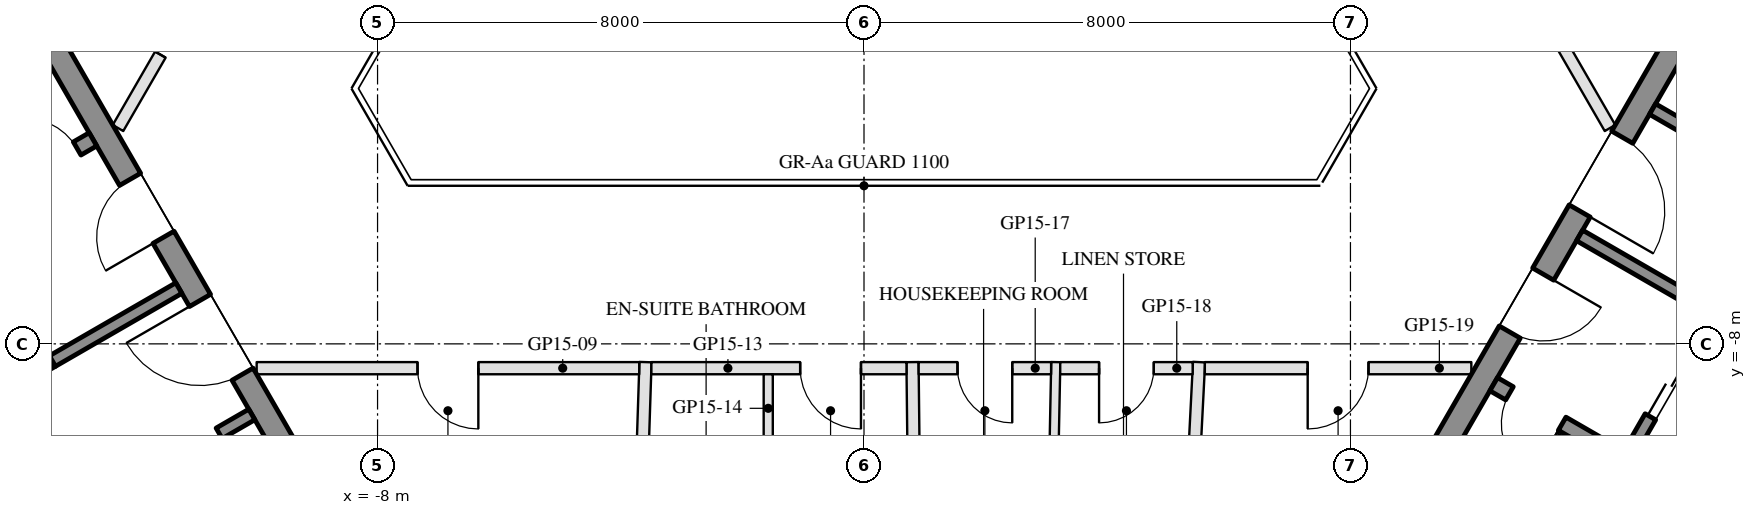
"""IFC4 building model, lengths in metres.
Left out: names, types, materials, properties, quantities, classifications, styles, units other than length and angle.
Written with IfcOpenShell. Run it as: python <this file> out.ifc"""

import sys

from ifc_helpers import new_model, si_unit, direction, frame, frame_2d, origin, place, context, subcontext, project, spatial, rectangle, extrude, element, fill, save


model = new_model("IFC4")
c1 = context("Model", 3, precision=1e-05, world=origin(), true_north=direction((0.0, 1.0)))
c2 = subcontext(c1, "Body", "Model", "MODEL_VIEW")
j1 = project(units=[si_unit("LENGTHUNIT", "METRE"), si_unit("PLANEANGLEUNIT", "RADIAN")], contexts=[c1])
p1 = place(None, origin())
s1 = spatial("IfcSite", under=j1, at=p1, CompositionType="ELEMENT")
p2 = place(p1, origin())
s2 = spatial("IfcBuilding", under=s1, at=p2, CompositionType="ELEMENT")
p3 = place(p2, frame((0.0, 0.0, 172.5)))
s3 = spatial("IfcBuildingStorey", under=s2, at=p3, CompositionType="ELEMENT", Elevation=172.5)
p4 = place(p3, frame((-13.845, -2.22, 0.0), z_axis=(0.0, 0.0, 1.0), x_axis=(0.500004234368, -0.866022959057, 0.0)))
e1 = element("IfcWall", 1, at=p4, inside=s3, PredefinedType="SHEAR", context=c2, shape_type="SweptSolid", body=[
    extrude(rectangle(XDim=10.0, YDim=0.4, at=frame_2d((5.0, 0.0))), origin(), (0.0, 0.0, 1.0), 3.5),
])
p5 = place(p4, frame((3.55, 0.0, 0.0)))
e2 = element("IfcOpeningElement", 2, at=p5, cuts=e1, PredefinedType="OPENING", context=c2, shape_type="SweptSolid", body=[
    extrude(rectangle(XDim=1.1, YDim=2.1, at=frame_2d((0.55, 1.05))), frame((0.0, 0.21, 0.0), z_axis=(0.0, -1.0, 0.0), x_axis=(1.0, 0.0, 0.0)), (0.0, 0.0, 1.0), 0.42),
])
p6 = place(p4, frame((5.85, 0.0, 0.0)))
e3 = element("IfcOpeningElement", 3, at=p6, cuts=e1, PredefinedType="OPENING", context=c2, shape_type="SweptSolid", body=[
    extrude(rectangle(XDim=1.4, YDim=2.1, at=frame_2d((0.7, 1.05))), frame((0.0, 0.21, 0.0), z_axis=(0.0, -1.0, 0.0), x_axis=(1.0, 0.0, 0.0)), (0.0, 0.0, 1.0), 0.42),
])
p7 = place(p3, frame((-12.681, -4.636, 0.0), z_axis=(0.0, 0.0, 1.0), x_axis=(-0.866021702275, -0.500006411147, 0.0)))
e4 = element("IfcWall", 4, at=p7, inside=s3, PredefinedType="SHEAR", context=c2, shape_type="SweptSolid", body=[
    extrude(rectangle(XDim=6.45, YDim=0.25, at=frame_2d((3.225, 0.0))), origin(), (0.0, 0.0, 1.0), 3.5),
])
p8 = place(p7, frame((0.3, 0.0, 0.0)))
e5 = element("IfcOpeningElement", 5, at=p8, cuts=e4, PredefinedType="OPENING", context=c2, shape_type="SweptSolid", body=[
    extrude(rectangle(XDim=1.0, YDim=2.1, at=frame_2d((0.5, 1.05))), frame((0.0, 0.135, 0.0), z_axis=(0.0, -1.0, 0.0), x_axis=(1.0, 0.0, 0.0)), (0.0, 0.0, 1.0), 0.27),
])
p9 = place(p3, frame((-14.783, -5.995, 0.0), z_axis=(0.0, 0.0, 1.0), x_axis=(0.49994636267, -0.866056369097, 0.0)))
e6 = element("IfcWall", 6, at=p9, inside=s3, PredefinedType="SHEAR", context=c2, shape_type="SweptSolid", body=[
    extrude(rectangle(XDim=2.8, YDim=0.2, at=frame_2d((1.4, 0.0))), origin(), (0.0, 0.0, 1.0), 3.5),
])
p10 = place(p9, frame((0.7, 0.0, 0.0)))
e7 = element("IfcOpeningElement", 7, at=p10, cuts=e6, PredefinedType="OPENING", context=c2, shape_type="SweptSolid", body=[
    extrude(rectangle(XDim=1.2, YDim=2.1, at=frame_2d((0.6, 1.05))), frame((0.0, 0.11, 0.0), z_axis=(0.0, -1.0, 0.0), x_axis=(1.0, 0.0, 0.0)), (0.0, 0.0, 1.0), 0.22),
])
p11 = place(p3, frame((-11.268, -7.083, 0.0), z_axis=(0.0, 0.0, 1.0), x_axis=(-0.866050077142, -0.499957262057, 0.0)))
e8 = element("IfcWall", 8, at=p11, inside=s3, PredefinedType="SHEAR", context=c2, shape_type="SweptSolid", body=[
    extrude(rectangle(XDim=2.4, YDim=0.2, at=frame_2d((1.2, 0.0))), origin(), (0.0, 0.0, 1.0), 3.5),
])
p12 = place(p3, frame((-10.068, -9.162, 0.0), z_axis=(0.0, 0.0, 1.0), x_axis=(-0.866032725843, -0.499987317609, 0.0)))
e9 = element("IfcWall", 9, at=p12, inside=s3, PredefinedType="SHEAR", context=c2, shape_type="SweptSolid", body=[
    extrude(rectangle(XDim=10.16, YDim=0.2, at=frame_2d((5.08, 0.0))), origin(), (0.0, 0.0, 1.0), 3.5),
])
p13 = place(p12, frame((0.62, 0.0, 0.0)))
e10 = element("IfcOpeningElement", 10, at=p13, cuts=e9, PredefinedType="OPENING", context=c2, shape_type="SweptSolid", body=[
    extrude(rectangle(XDim=1.1, YDim=2.1, at=frame_2d((0.55, 1.05))), frame((0.0, 0.11, 0.0), z_axis=(0.0, -1.0, 0.0), x_axis=(1.0, 0.0, 0.0)), (0.0, 0.0, 1.0), 0.22),
])
p14 = place(p12, frame((3.16, 0.0, 0.0)))
e11 = element("IfcOpeningElement", 11, at=p14, cuts=e9, PredefinedType="OPENING", context=c2, shape_type="SweptSolid", body=[
    extrude(rectangle(XDim=1.1, YDim=2.1, at=frame_2d((0.55, 1.05))), frame((0.0, 0.11, 0.0), z_axis=(0.0, -1.0, 0.0), x_axis=(1.0, 0.0, 0.0)), (0.0, 0.0, 1.0), 0.22),
])
p15 = place(p12, frame((5.7, 0.0, 0.0)))
e12 = element("IfcOpeningElement", 12, at=p15, cuts=e9, PredefinedType="OPENING", context=c2, shape_type="SweptSolid", body=[
    extrude(rectangle(XDim=1.1, YDim=2.1, at=frame_2d((0.55, 1.05))), frame((0.0, 0.11, 0.0), z_axis=(0.0, -1.0, 0.0), x_axis=(1.0, 0.0, 0.0)), (0.0, 0.0, 1.0), 0.22),
])
p16 = place(p12, frame((8.24, 0.0, 0.0)))
e13 = element("IfcOpeningElement", 13, at=p16, cuts=e9, PredefinedType="OPENING", context=c2, shape_type="SweptSolid", body=[
    extrude(rectangle(XDim=1.1, YDim=2.1, at=frame_2d((0.55, 1.05))), frame((0.0, 0.11, 0.0), z_axis=(0.0, -1.0, 0.0), x_axis=(1.0, 0.0, 0.0)), (0.0, 0.0, 1.0), 0.22),
])
p17 = place(p3, frame((8.845, -10.88, 0.0), z_axis=(0.0, 0.0, 1.0), x_axis=(0.500004234368, 0.866022959057, 0.0)))
e14 = element("IfcWall", 14, at=p17, inside=s3, PredefinedType="SHEAR", context=c2, shape_type="SweptSolid", body=[
    extrude(rectangle(XDim=10.0, YDim=0.4, at=frame_2d((5.0, 0.0))), origin(), (0.0, 0.0, 1.0), 3.5),
])
p18 = place(p17, frame((3.55, 0.0, 0.0)))
e15 = element("IfcOpeningElement", 15, at=p18, cuts=e14, PredefinedType="OPENING", context=c2, shape_type="SweptSolid", body=[
    extrude(rectangle(XDim=1.1, YDim=2.1, at=frame_2d((0.55, 1.05))), frame((0.0, 0.21, 0.0), z_axis=(0.0, -1.0, 0.0), x_axis=(1.0, 0.0, 0.0)), (0.0, 0.0, 1.0), 0.42),
])
p19 = place(p17, frame((5.85, 0.0, 0.0)))
e16 = element("IfcOpeningElement", 16, at=p19, cuts=e14, PredefinedType="OPENING", context=c2, shape_type="SweptSolid", body=[
    extrude(rectangle(XDim=1.4, YDim=2.1, at=frame_2d((0.7, 1.05))), frame((0.0, 0.21, 0.0), z_axis=(0.0, -1.0, 0.0), x_axis=(1.0, 0.0, 0.0)), (0.0, 0.0, 1.0), 0.42),
])
p20 = place(p3, frame((10.356, -8.664, 0.0), z_axis=(0.0, 0.0, 1.0), x_axis=(0.866028629588, -0.499994412703, 0.0)))
e17 = element("IfcWall", 17, at=p20, inside=s3, PredefinedType="SHEAR", context=c2, shape_type="SweptSolid", body=[
    extrude(rectangle(XDim=6.45, YDim=0.25, at=frame_2d((3.225, 0.0))), origin(), (0.0, 0.0, 1.0), 3.5),
])
p21 = place(p20, frame((0.3, 0.0, 0.0)))
e18 = element("IfcOpeningElement", 18, at=p21, cuts=e17, PredefinedType="OPENING", context=c2, shape_type="SweptSolid", body=[
    extrude(rectangle(XDim=1.0, YDim=2.1, at=frame_2d((0.5, 1.05))), frame((0.0, 0.135, 0.0), z_axis=(0.0, -1.0, 0.0), x_axis=(1.0, 0.0, 0.0)), (0.0, 0.0, 1.0), 0.27),
])
p22 = place(p3, frame((12.583, -9.805, 0.0), z_axis=(0.0, 0.0, 1.0), x_axis=(0.49994636267, 0.866056369097, 0.0)))
e19 = element("IfcWall", 19, at=p22, inside=s3, PredefinedType="SHEAR", context=c2, shape_type="SweptSolid", body=[
    extrude(rectangle(XDim=2.8, YDim=0.2, at=frame_2d((1.4, 0.0))), origin(), (0.0, 0.0, 1.0), 3.5),
])
p23 = place(p22, frame((0.7, 0.0, 0.0)))
e20 = element("IfcOpeningElement", 20, at=p23, cuts=e19, PredefinedType="OPENING", context=c2, shape_type="SweptSolid", body=[
    extrude(rectangle(XDim=1.2, YDim=2.1, at=frame_2d((0.6, 1.05))), frame((0.0, 0.11, 0.0), z_axis=(0.0, -1.0, 0.0), x_axis=(1.0, 0.0, 0.0)), (0.0, 0.0, 1.0), 0.22),
])
p24 = place(p3, frame((11.768, -6.217, 0.0), z_axis=(0.0, 0.0, 1.0), x_axis=(0.866050077142, -0.499957262057, 0.0)))
e21 = element("IfcWall", 21, at=p24, inside=s3, PredefinedType="SHEAR", context=c2, shape_type="SweptSolid", body=[
    extrude(rectangle(XDim=2.4, YDim=0.2, at=frame_2d((1.2, 0.0))), origin(), (0.0, 0.0, 1.0), 3.5),
])
p25 = place(p3, frame((12.968, -4.138, 0.0), z_axis=(0.0, 0.0, 1.0), x_axis=(0.866028328073, -0.49999493495, 0.0)))
e22 = element("IfcWall", 22, at=p25, inside=s3, PredefinedType="SHEAR", context=c2, shape_type="SweptSolid", body=[
    extrude(rectangle(XDim=10.16, YDim=0.2, at=frame_2d((5.08, 0.0))), origin(), (0.0, 0.0, 1.0), 3.5),
])
p26 = place(p25, frame((0.72, 0.0, 0.0)))
e23 = element("IfcOpeningElement", 23, at=p26, cuts=e22, PredefinedType="OPENING", context=c2, shape_type="SweptSolid", body=[
    extrude(rectangle(XDim=0.9, YDim=2.1, at=frame_2d((0.45, 1.05))), frame((0.0, 0.11, 0.0), z_axis=(0.0, -1.0, 0.0), x_axis=(1.0, 0.0, 0.0)), (0.0, 0.0, 1.0), 0.22),
])
p27 = place(p25, frame((5.8, 0.0, 0.0)))
e24 = element("IfcOpeningElement", 24, at=p27, cuts=e22, PredefinedType="OPENING", context=c2, shape_type="SweptSolid", body=[
    extrude(rectangle(XDim=0.9, YDim=2.1, at=frame_2d((0.45, 1.05))), frame((0.0, 0.11, 0.0), z_axis=(0.0, -1.0, 0.0), x_axis=(1.0, 0.0, 0.0)), (0.0, 0.0, 1.0), 0.22),
])
p28 = place(p3, frame((-3.921, -18.38, 0.0), z_axis=(0.0, 0.0, 1.0), x_axis=(0.032462838588, 0.999472943161, 0.0)))
e25 = element("IfcWall", 25, at=p28, inside=s3, PredefinedType="PARTITIONING", context=c2, shape_type="SweptSolid", body=[
    extrude(rectangle(XDim=10.085, YDim=0.2, at=frame_2d((5.042, 0.0))), origin(), (0.0, 0.0, 1.0), 2.95),
])
p29 = place(p3, frame((0.92, -19.28, 0.0), z_axis=(0.0, 0.0, 1.0), x_axis=(-0.011116847578, 0.999938205941, 0.0)))
e26 = element("IfcWall", 26, at=p29, inside=s3, PredefinedType="PARTITIONING", context=c2, shape_type="SweptSolid", body=[
    extrude(rectangle(XDim=10.981, YDim=0.2, at=frame_2d((5.49, 0.0))), origin(), (0.0, 0.0, 1.0), 3.06),
])
p30 = place(p3, frame((4.95, -19.28, 0.0), z_axis=(0.0, 0.0, 1.0), x_axis=(0.050963172582, 0.998700533213, 0.0)))
e27 = element("IfcWall", 27, at=p30, inside=s3, PredefinedType="PARTITIONING", context=c2, shape_type="SweptSolid", body=[
    extrude(rectangle(XDim=10.994, YDim=0.2, at=frame_2d((5.497, 0.0))), origin(), (0.0, 0.0, 1.0), 3.06),
])
p31 = place(p3, frame((-3.697, -8.4, 0.0), z_axis=(0.0, 0.0, 1.0), x_axis=(-1.0, 0.0, 0.0)))
e28 = element("IfcWall", 28, at=p31, inside=s3, PredefinedType="PARTITIONING", context=c2, shape_type="SweptSolid", body=[
    extrude(rectangle(XDim=6.292, YDim=0.2, at=frame_2d((3.146, 0.0))), origin(), (0.0, 0.0, 1.0), 2.95),
])
p32 = place(p31, frame((2.646, 0.0, 0.0)))
e29 = element("IfcOpeningElement", 29, at=p32, cuts=e28, PredefinedType="OPENING", context=c2, shape_type="SweptSolid", body=[
    extrude(rectangle(XDim=1.0, YDim=2.1, at=frame_2d((0.5, 1.05))), frame((0.0, 0.11, 0.0), z_axis=(0.0, -1.0, 0.0), x_axis=(1.0, 0.0, 0.0)), (0.0, 0.0, 1.0), 0.22),
])
p33 = place(p3, frame((0.699, -8.4, 0.0), z_axis=(0.0, 0.0, 1.0), x_axis=(-1.0, 0.0, 0.0)))
e30 = element("IfcWall", 30, at=p33, inside=s3, PredefinedType="PARTITIONING", context=c2, shape_type="SweptSolid", body=[
    extrude(rectangle(XDim=4.196, YDim=0.2, at=frame_2d((2.098, 0.0))), origin(), (0.0, 0.0, 1.0), 2.95),
])
p34 = place(p33, frame((0.749, 0.0, 0.0)))
e31 = element("IfcOpeningElement", 31, at=p34, cuts=e30, PredefinedType="OPENING", context=c2, shape_type="SweptSolid", body=[
    extrude(rectangle(XDim=1.0, YDim=2.1, at=frame_2d((0.5, 1.05))), frame((0.0, 0.11, 0.0), z_axis=(0.0, -1.0, 0.0), x_axis=(1.0, 0.0, 0.0)), (0.0, 0.0, 1.0), 0.22),
])
p35 = place(p3, frame((-1.575, -11.3, 0.0), z_axis=(0.0, 0.0, 1.0), x_axis=(0.0, 1.0, 0.0)))
e32 = element("IfcWall", 32, at=p35, inside=s3, PredefinedType="PARTITIONING", context=c2, shape_type="SweptSolid", body=[
    extrude(rectangle(XDim=2.8, YDim=0.15, at=frame_2d((1.4, 0.0))), origin(), (0.0, 0.0, 1.0), 3.55),
])
p36 = place(p35, frame((0.5, 0.0, 0.0)))
e33 = element("IfcOpeningElement", 33, at=p36, cuts=e32, PredefinedType="OPENING", context=c2, shape_type="SweptSolid", body=[
    extrude(rectangle(XDim=0.9, YDim=2.1, at=frame_2d((0.45, 1.05))), frame((0.0, 0.085, 0.0), z_axis=(0.0, -1.0, 0.0), x_axis=(1.0, 0.0, 0.0)), (0.0, 0.0, 1.0), 0.17),
])
p37 = place(p3, frame((2.935, -19.28, 0.0), z_axis=(0.0, 0.0, 1.0), x_axis=(0.019940891206, 0.99980116066, 0.0)))
e34 = element("IfcWall", 34, at=p37, inside=s3, PredefinedType="PARTITIONING", context=c2, shape_type="SweptSolid", body=[
    extrude(rectangle(XDim=10.982, YDim=0.15, at=frame_2d((5.491, 0.0))), origin(), (0.0, 0.0, 1.0), 3.06),
])
p38 = place(p3, frame((3.077, -8.4, 0.0), z_axis=(0.0, 0.0, 1.0), x_axis=(-1.0, 0.0, 0.0)))
e35 = element("IfcWall", 35, at=p38, inside=s3, PredefinedType="PARTITIONING", context=c2, shape_type="SweptSolid", body=[
    extrude(rectangle(XDim=2.178, YDim=0.2, at=frame_2d((1.089, 0.0))), origin(), (0.0, 0.0, 1.0), 3.55),
])
p39 = place(p38, frame((0.639, 0.0, 0.0)))
e36 = element("IfcOpeningElement", 36, at=p39, cuts=e35, PredefinedType="OPENING", context=c2, shape_type="SweptSolid", body=[
    extrude(rectangle(XDim=0.9, YDim=2.1, at=frame_2d((0.45, 1.05))), frame((0.0, 0.11, 0.0), z_axis=(0.0, -1.0, 0.0), x_axis=(1.0, 0.0, 0.0)), (0.0, 0.0, 1.0), 0.22),
])
p40 = place(p3, frame((5.405, -8.4, 0.0), z_axis=(0.0, 0.0, 1.0), x_axis=(-1.0, 0.0, 0.0)))
e37 = element("IfcWall", 37, at=p40, inside=s3, PredefinedType="PARTITIONING", context=c2, shape_type="SweptSolid", body=[
    extrude(rectangle(XDim=2.178, YDim=0.2, at=frame_2d((1.089, 0.0))), origin(), (0.0, 0.0, 1.0), 2.95),
])
p41 = place(p40, frame((0.639, 0.0, 0.0)))
e38 = element("IfcOpeningElement", 38, at=p41, cuts=e37, PredefinedType="OPENING", context=c2, shape_type="SweptSolid", body=[
    extrude(rectangle(XDim=0.9, YDim=2.1, at=frame_2d((0.45, 1.05))), frame((0.0, 0.11, 0.0), z_axis=(0.0, -1.0, 0.0), x_axis=(1.0, 0.0, 0.0)), (0.0, 0.0, 1.0), 0.22),
])
p42 = place(p3, frame((9.988, -8.4, 0.0), z_axis=(0.0, 0.0, 1.0), x_axis=(-1.0, 0.0, 0.0)))
e39 = element("IfcWall", 39, at=p42, inside=s3, PredefinedType="PARTITIONING", context=c2, shape_type="SweptSolid", body=[
    extrude(rectangle(XDim=4.383, YDim=0.2, at=frame_2d((2.191, 0.0))), origin(), (0.0, 0.0, 1.0), 2.95),
])
p43 = place(p42, frame((1.691, 0.0, 0.0)))
e40 = element("IfcOpeningElement", 40, at=p43, cuts=e39, PredefinedType="OPENING", context=c2, shape_type="SweptSolid", body=[
    extrude(rectangle(XDim=1.0, YDim=2.1, at=frame_2d((0.5, 1.05))), frame((0.0, 0.11, 0.0), z_axis=(0.0, -1.0, 0.0), x_axis=(1.0, 0.0, 0.0)), (0.0, 0.0, 1.0), 0.22),
])
p44 = place(p3, frame((9.931, -0.401, 0.0), z_axis=(0.0, 0.0, 1.0), x_axis=(0.5000418389, -0.866001246737, 0.0)))
e41 = element("IfcWall", 41, at=p44, inside=s3, PredefinedType="PARTITIONING", context=c2, shape_type="SweptSolid", body=[
    extrude(rectangle(XDim=4.676, YDim=0.2, at=frame_2d((2.338, 0.0))), origin(), (0.0, 0.0, 1.0), 2.95),
])
p45 = place(p44, frame((1.838, 0.0, 0.0)))
e42 = element("IfcOpeningElement", 42, at=p45, cuts=e41, PredefinedType="OPENING", context=c2, shape_type="SweptSolid", body=[
    extrude(rectangle(XDim=1.0, YDim=2.1, at=frame_2d((0.5, 1.05))), frame((0.0, 0.11, 0.0), z_axis=(0.0, -1.0, 0.0), x_axis=(1.0, 0.0, 0.0)), (0.0, 0.0, 1.0), 0.22),
])
p46 = place(p3, frame((-12.269, -4.45, 0.0), z_axis=(0.0, 0.0, 1.0), x_axis=(0.500055316652, 0.865993464345, 0.0)))
e43 = element("IfcWall", 43, at=p46, inside=s3, PredefinedType="PARTITIONING", context=c2, shape_type="SweptSolid", body=[
    extrude(rectangle(XDim=3.788, YDim=0.2, at=frame_2d((1.894, 0.0))), origin(), (0.0, 0.0, 1.0), 2.95),
])
p47 = place(p46, frame((1.394, 0.0, 0.0)))
e44 = element("IfcOpeningElement", 44, at=p47, cuts=e43, PredefinedType="OPENING", context=c2, shape_type="SweptSolid", body=[
    extrude(rectangle(XDim=1.0, YDim=2.1, at=frame_2d((0.5, 1.05))), frame((0.0, 0.11, 0.0), z_axis=(0.0, -1.0, 0.0), x_axis=(1.0, 0.0, 0.0)), (0.0, 0.0, 1.0), 0.22),
])
p48 = place(p13, origin())
e45 = element("IfcDoor", 45, at=p48, inside=s3, OperationType="DOUBLE_DOOR_SLIDING", PredefinedType="DOOR", context=c2, shape_type="SweptSolid", body=[
    extrude(rectangle(XDim=1.1, YDim=2.1, at=frame_2d((0.55, 1.05))), frame((0.0, 0.025, 0.0), z_axis=(0.0, -1.0, 0.0), x_axis=(1.0, 0.0, 0.0)), (0.0, 0.0, 1.0), 0.05),
])
fill(e10, e45)
p49 = place(p5, frame((1.1, 0.0, 0.0), z_axis=(0.0, 0.0, 1.0), x_axis=(-1.0, 0.0, 0.0)))
e46 = element("IfcDoor", 46, at=p49, inside=s3, OperationType="SINGLE_SWING_LEFT", PredefinedType="DOOR", context=c2, shape_type="SweptSolid", body=[
    extrude(rectangle(XDim=1.1, YDim=2.1, at=frame_2d((0.55, 1.05))), frame((0.0, 0.025, 0.0), z_axis=(0.0, -1.0, 0.0), x_axis=(1.0, 0.0, 0.0)), (0.0, 0.0, 1.0), 0.05),
])
fill(e2, e46)
p50 = place(p6, frame((1.4, 0.0, 0.0), z_axis=(0.0, 0.0, 1.0), x_axis=(-1.0, 0.0, 0.0)))
e47 = element("IfcDoor", 47, at=p50, inside=s3, OperationType="DOUBLE_DOOR_SINGLE_SWING", PredefinedType="DOOR", context=c2, shape_type="SweptSolid", body=[
    extrude(rectangle(XDim=1.4, YDim=2.1, at=frame_2d((0.7, 1.05))), frame((0.0, 0.025, 0.0), z_axis=(0.0, -1.0, 0.0), x_axis=(1.0, 0.0, 0.0)), (0.0, 0.0, 1.0), 0.05),
])
fill(e3, e47)
p51 = place(p8, frame((1.0, 0.0, 0.0), z_axis=(0.0, 0.0, 1.0), x_axis=(-1.0, 0.0, 0.0)))
e48 = element("IfcDoor", 48, at=p51, inside=s3, OperationType="SINGLE_SWING_LEFT", PredefinedType="DOOR", context=c2, shape_type="SweptSolid", body=[
    extrude(rectangle(XDim=1.0, YDim=2.1, at=frame_2d((0.5, 1.05))), frame((0.0, 0.025, 0.0), z_axis=(0.0, -1.0, 0.0), x_axis=(1.0, 0.0, 0.0)), (0.0, 0.0, 1.0), 0.05),
])
fill(e5, e48)
p52 = place(p23, origin())
e49 = element("IfcDoor", 49, at=p52, inside=s3, OperationType="DOUBLE_DOOR_SLIDING", PredefinedType="DOOR", context=c2, shape_type="SweptSolid", body=[
    extrude(rectangle(XDim=1.2, YDim=2.1, at=frame_2d((0.6, 1.05))), frame((0.0, 0.025, 0.0), z_axis=(0.0, -1.0, 0.0), x_axis=(1.0, 0.0, 0.0)), (0.0, 0.0, 1.0), 0.05),
])
fill(e20, e49)
p53 = place(p18, frame((1.1, 0.0, 0.0), z_axis=(0.0, 0.0, 1.0), x_axis=(-1.0, 0.0, 0.0)))
e50 = element("IfcDoor", 50, at=p53, inside=s3, OperationType="SINGLE_SWING_LEFT", PredefinedType="DOOR", context=c2, shape_type="SweptSolid", body=[
    extrude(rectangle(XDim=1.1, YDim=2.1, at=frame_2d((0.55, 1.05))), frame((0.0, 0.025, 0.0), z_axis=(0.0, -1.0, 0.0), x_axis=(1.0, 0.0, 0.0)), (0.0, 0.0, 1.0), 0.05),
])
fill(e15, e50)
p54 = place(p19, frame((1.4, 0.0, 0.0), z_axis=(0.0, 0.0, 1.0), x_axis=(-1.0, 0.0, 0.0)))
e51 = element("IfcDoor", 51, at=p54, inside=s3, OperationType="DOUBLE_DOOR_SINGLE_SWING", PredefinedType="DOOR", context=c2, shape_type="SweptSolid", body=[
    extrude(rectangle(XDim=1.4, YDim=2.1, at=frame_2d((0.7, 1.05))), frame((0.0, 0.025, 0.0), z_axis=(0.0, -1.0, 0.0), x_axis=(1.0, 0.0, 0.0)), (0.0, 0.0, 1.0), 0.05),
])
fill(e16, e51)
p55 = place(p21, frame((1.0, 0.0, 0.0), z_axis=(0.0, 0.0, 1.0), x_axis=(-1.0, 0.0, 0.0)))
e52 = element("IfcDoor", 52, at=p55, inside=s3, OperationType="SINGLE_SWING_LEFT", PredefinedType="DOOR", context=c2, shape_type="SweptSolid", body=[
    extrude(rectangle(XDim=1.0, YDim=2.1, at=frame_2d((0.5, 1.05))), frame((0.0, 0.025, 0.0), z_axis=(0.0, -1.0, 0.0), x_axis=(1.0, 0.0, 0.0)), (0.0, 0.0, 1.0), 0.05),
])
fill(e18, e52)
p56 = place(p32, origin())
e53 = element("IfcDoor", 53, at=p56, inside=s3, OperationType="SINGLE_SWING_LEFT", PredefinedType="DOOR", context=c2, shape_type="SweptSolid", body=[
    extrude(rectangle(XDim=1.0, YDim=2.1, at=frame_2d((0.5, 1.05))), frame((0.0, 0.025, 0.0), z_axis=(0.0, -1.0, 0.0), x_axis=(1.0, 0.0, 0.0)), (0.0, 0.0, 1.0), 0.05),
])
fill(e29, e53)
p57 = place(p34, origin())
e54 = element("IfcDoor", 54, at=p57, inside=s3, OperationType="SINGLE_SWING_LEFT", PredefinedType="DOOR", context=c2, shape_type="SweptSolid", body=[
    extrude(rectangle(XDim=1.0, YDim=2.1, at=frame_2d((0.5, 1.05))), frame((0.0, 0.025, 0.0), z_axis=(0.0, -1.0, 0.0), x_axis=(1.0, 0.0, 0.0)), (0.0, 0.0, 1.0), 0.05),
])
fill(e31, e54)
p58 = place(p39, origin())
e55 = element("IfcDoor", 55, at=p58, inside=s3, OperationType="SINGLE_SWING_LEFT", PredefinedType="DOOR", context=c2, shape_type="SweptSolid", body=[
    extrude(rectangle(XDim=0.9, YDim=2.1, at=frame_2d((0.45, 1.05))), frame((0.0, 0.025, 0.0), z_axis=(0.0, -1.0, 0.0), x_axis=(1.0, 0.0, 0.0)), (0.0, 0.0, 1.0), 0.05),
])
fill(e36, e55)
p59 = place(p41, origin())
e56 = element("IfcDoor", 56, at=p59, inside=s3, OperationType="SINGLE_SWING_RIGHT", PredefinedType="DOOR", context=c2, shape_type="SweptSolid", body=[
    extrude(rectangle(XDim=0.9, YDim=2.1, at=frame_2d((0.45, 1.05))), frame((0.0, 0.025, 0.0), z_axis=(0.0, -1.0, 0.0), x_axis=(1.0, 0.0, 0.0)), (0.0, 0.0, 1.0), 0.05),
])
fill(e38, e56)
p60 = place(p43, origin())
e57 = element("IfcDoor", 57, at=p60, inside=s3, OperationType="SINGLE_SWING_RIGHT", PredefinedType="DOOR", context=c2, shape_type="SweptSolid", body=[
    extrude(rectangle(XDim=1.0, YDim=2.1, at=frame_2d((0.5, 1.05))), frame((0.0, 0.025, 0.0), z_axis=(0.0, -1.0, 0.0), x_axis=(1.0, 0.0, 0.0)), (0.0, 0.0, 1.0), 0.05),
])
fill(e40, e57)
p61 = place(p47, origin())
e58 = element("IfcDoor", 58, at=p61, inside=s3, OperationType="SINGLE_SWING_RIGHT", PredefinedType="DOOR", context=c2, shape_type="SweptSolid", body=[
    extrude(rectangle(XDim=1.0, YDim=2.1, at=frame_2d((0.5, 1.05))), frame((0.0, 0.025, 0.0), z_axis=(0.0, -1.0, 0.0), x_axis=(1.0, 0.0, 0.0)), (0.0, 0.0, 1.0), 0.05),
])
fill(e44, e58)
save(model, sys.argv[1])
